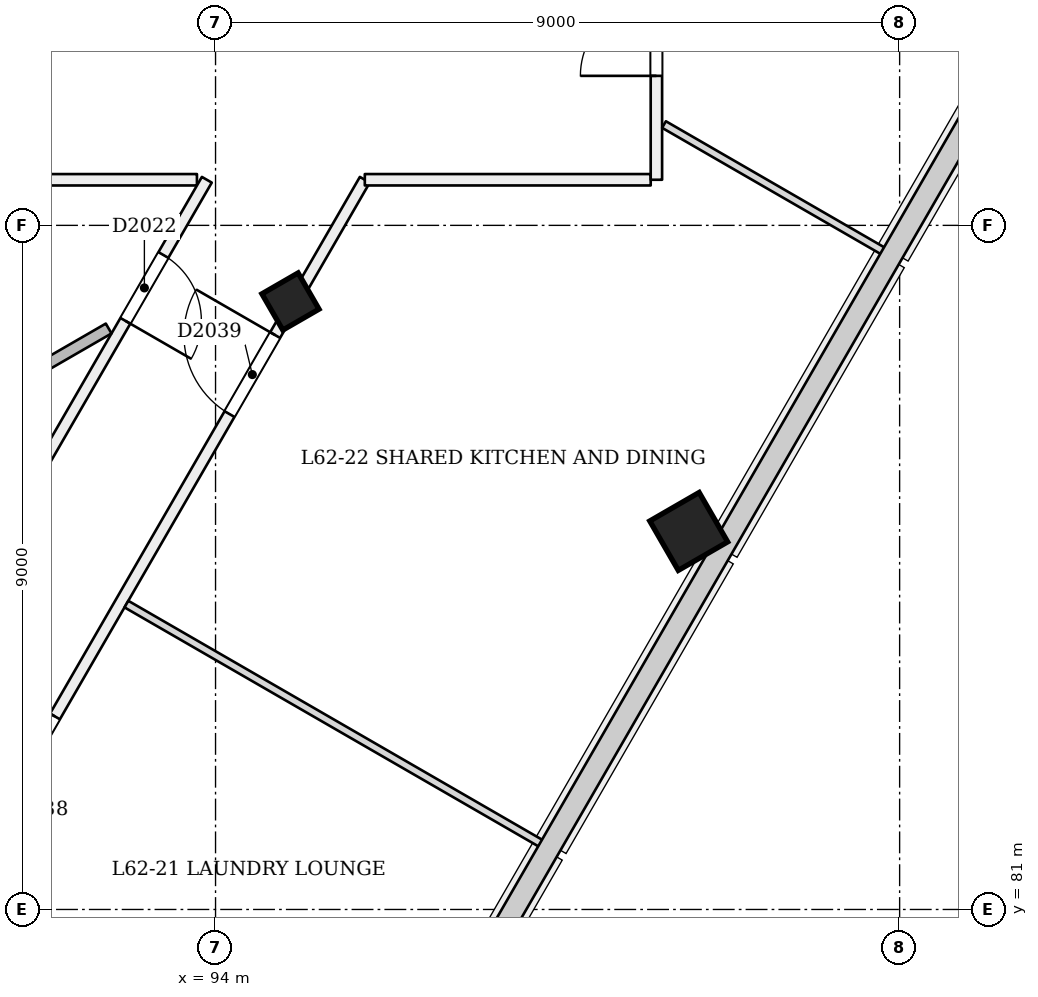
"""IFC4 building model, lengths in metres.
Left out: names, types, materials, properties, quantities, classifications, styles, units other than length and angle.
Written with IfcOpenShell. Run it as: python <this file> out.ifc"""

import sys

from ifc_helpers import new_model, si_unit, direction, frame, frame_2d, origin, origin_2d, place, context, subcontext, project, spatial, rectangle, extrude, element, fill, save


model = new_model("IFC4")
c1 = context("Model", 3, precision=1e-05, world=origin(), true_north=direction((0.0, 1.0)))
c2 = subcontext(c1, "Body", "Model", "MODEL_VIEW")
j1 = project(units=[si_unit("LENGTHUNIT", "METRE"), si_unit("PLANEANGLEUNIT", "RADIAN")], contexts=[c1])
p1 = place(None, origin())
s1 = spatial("IfcSite", under=j1, at=p1, CompositionType="ELEMENT")
p2 = place(p1, origin())
s2 = spatial("IfcBuilding", under=s1, at=p2, CompositionType="ELEMENT")
p3 = place(p2, frame((0.0, 0.0, 242.8)))
s3 = spatial("IfcBuildingStorey", under=s2, at=p3, CompositionType="ELEMENT", Elevation=242.8)
p4 = place(p3, frame((95.013, 88.952, -0.017), z_axis=(-0.02215369191, 0.038413282303, 0.999016333038), x_axis=(-0.500657396395, -0.86536153355, 0.022171776814)))
e1 = element("IfcColumn", 1, at=p4, inside=s3, PredefinedType="COLUMN", context=c2, shape_type="SweptSolid", body=[
    extrude(rectangle(XDim=0.55, YDim=0.55, at=origin_2d()), origin(), (0.0, 0.0, 1.0), 3.604),
])
p5 = place(p3, frame((100.252, 85.926, -0.023), z_axis=(-0.022222852987, 0.038483477124, 0.999012095419), x_axis=(-0.500174596178, -0.865639456654, 0.022219460416)))
e2 = element("IfcColumn", 2, at=p5, inside=s3, PredefinedType="COLUMN", context=c2, shape_type="SweptSolid", body=[
    extrude(rectangle(XDim=0.75, YDim=0.75, at=origin_2d()), origin(), (0.0, 0.0, 1.0), 3.604),
])
p6 = place(p3, frame((88.0, 90.599, 0.0), z_axis=(0.0, 0.0, 1.0), x_axis=(0.999999985605, 0.000169678457, 0.0)))
e3 = element("IfcWall", 3, at=p6, inside=s3, PredefinedType="PARTITIONING", context=c2, shape_type="SweptSolid", body=[
    extrude(rectangle(XDim=5.755, YDim=0.15, at=frame_2d((2.878, 0.0))), origin(), (0.0, 0.0, 1.0), 3.2),
])
p7 = place(p3, frame((85.0, 71.61, 0.0), z_axis=(0.0, 0.0, 1.0), x_axis=(0.499999699483, 0.866025577288, 0.0)))
e4 = element("IfcWall", 4, at=p7, inside=s3, PredefinedType="PARTITIONING", context=c2, shape_type="SweptSolid", body=[
    extrude(rectangle(XDim=21.928, YDim=0.15, at=frame_2d((10.964, 0.0))), origin(), (0.0, 0.0, 1.0), 2.8),
])
p8 = place(p7, frame((0.608, 0.0, 0.0)))
e5 = element("IfcOpeningElement", 5, at=p8, cuts=e4, PredefinedType="OPENING", context=c2, shape_type="SweptSolid", body=[
    extrude(rectangle(XDim=1.0, YDim=2.1, at=frame_2d((0.5, 1.05))), frame((0.0, 0.085, 0.0), z_axis=(0.0, -1.0, 0.0), x_axis=(1.0, 0.0, 0.0)), (0.0, 0.0, 1.0), 0.171),
])
p9 = place(p7, frame((4.804, 0.0, 0.0)))
e6 = element("IfcOpeningElement", 6, at=p9, cuts=e4, PredefinedType="OPENING", context=c2, shape_type="SweptSolid", body=[
    extrude(rectangle(XDim=1.0, YDim=2.1, at=frame_2d((0.5, 1.05))), frame((0.0, 0.085, 0.0), z_axis=(0.0, -1.0, 0.0), x_axis=(1.0, 0.0, 0.0)), (0.0, 0.0, 1.0), 0.171),
])
p10 = place(p7, frame((8.275, 0.0, 0.0)))
e7 = element("IfcOpeningElement", 7, at=p10, cuts=e4, PredefinedType="OPENING", context=c2, shape_type="SweptSolid", body=[
    extrude(rectangle(XDim=1.0, YDim=2.1, at=frame_2d((0.5, 1.05))), frame((0.0, 0.085, 0.0), z_axis=(0.0, -1.0, 0.0), x_axis=(1.0, 0.0, 0.0)), (0.0, 0.0, 1.0), 0.171),
])
p11 = place(p7, frame((12.775, 0.0, 0.0)))
e8 = element("IfcOpeningElement", 8, at=p11, cuts=e4, PredefinedType="OPENING", context=c2, shape_type="SweptSolid", body=[
    extrude(rectangle(XDim=1.0, YDim=2.1, at=frame_2d((0.5, 1.05))), frame((0.0, 0.085, 0.0), z_axis=(0.0, -1.0, 0.0), x_axis=(1.0, 0.0, 0.0)), (0.0, 0.0, 1.0), 0.171),
])
p12 = place(p7, frame((18.368, 0.0, 0.0)))
e9 = element("IfcOpeningElement", 9, at=p12, cuts=e4, PredefinedType="OPENING", context=c2, shape_type="SweptSolid", body=[
    extrude(rectangle(XDim=1.2, YDim=2.1, at=frame_2d((0.6, 1.05))), frame((0.0, 0.085, 0.0), z_axis=(0.0, -1.0, 0.0), x_axis=(1.0, 0.0, 0.0)), (0.0, 0.0, 1.0), 0.171),
])
p13 = place(p3, frame((95.964, 90.6, 0.0), z_axis=(0.0, 0.0, 1.0), x_axis=(1.0, 0.0, 0.0)))
e10 = element("IfcWall", 10, at=p13, inside=s3, PredefinedType="PARTITIONING", context=c2, shape_type="SweptSolid", body=[
    extrude(rectangle(XDim=3.761, YDim=0.15, at=frame_2d((1.881, 0.0))), origin(), (0.0, 0.0, 1.0), 3.2),
])
p14 = place(p3, frame((99.8, 90.6, 0.0), z_axis=(0.0, 0.0, 1.0), x_axis=(0.0, 1.0, 0.0)))
e11 = element("IfcWall", 11, at=p14, inside=s3, PredefinedType="PARTITIONING", context=c2, shape_type="SweptSolid", body=[
    extrude(rectangle(XDim=6.644, YDim=0.15, at=frame_2d((3.322, 0.0))), origin(), (0.0, 0.0, 1.0), 3.2),
])
p15 = place(p14, frame((1.367, 0.0, 0.0)))
e12 = element("IfcOpeningElement", 12, at=p15, cuts=e11, PredefinedType="OPENING", context=c2, shape_type="SweptSolid", body=[
    extrude(rectangle(XDim=1.0, YDim=2.1, at=frame_2d((0.5, 1.05))), frame((0.0, 0.085, 0.0), z_axis=(0.0, -1.0, 0.0), x_axis=(1.0, 0.0, 0.0)), (0.0, 0.0, 1.0), 0.171),
])
p16 = place(p3, frame((93.885, 90.6, 0.0), z_axis=(0.0, 0.0, 1.0), x_axis=(-0.499997192861, -0.866027024481, 0.0)))
e13 = element("IfcWall", 13, at=p16, inside=s3, PredefinedType="PARTITIONING", context=c2, shape_type="SweptSolid", body=[
    extrude(rectangle(XDim=17.641, YDim=0.15, at=frame_2d((8.82, 0.0))), origin(), (0.0, 0.0, 1.0), 3.2),
])
p17 = place(p16, frame((1.143, 0.0, 0.0)))
e14 = element("IfcOpeningElement", 14, at=p17, cuts=e13, PredefinedType="OPENING", context=c2, shape_type="SweptSolid", body=[
    extrude(rectangle(XDim=1.0, YDim=2.1, at=frame_2d((0.5, 1.05))), frame((0.0, 0.085, 0.0), z_axis=(0.0, -1.0, 0.0), x_axis=(1.0, 0.0, 0.0)), (0.0, 0.0, 1.0), 0.171),
])
p18 = place(p16, frame((7.281, 0.0, 0.0)))
e15 = element("IfcOpeningElement", 15, at=p18, cuts=e13, PredefinedType="OPENING", context=c2, shape_type="SweptSolid", body=[
    extrude(rectangle(XDim=1.0, YDim=2.1, at=frame_2d((0.5, 1.05))), frame((0.0, 0.085, 0.0), z_axis=(0.0, -1.0, 0.0), x_axis=(1.0, 0.0, 0.0)), (0.0, 0.0, 1.0), 0.171),
])
p19 = place(p3, frame((88.0, 85.991, 0.0), z_axis=(0.0, 0.0, 1.0), x_axis=(0.86602540409, 0.49999999947, 0.0)))
e16 = element("IfcWall", 16, at=p19, inside=s3, PredefinedType="PARTITIONING", context=c2, shape_type="SweptSolid", body=[
    extrude(rectangle(XDim=5.305, YDim=0.15, at=frame_2d((2.652, 0.0))), origin(), (0.0, 0.0, 1.0), 3.2),
])
p20 = place(p3, frame((96.055, 77.958, 0.0), z_axis=(0.0, 0.0, 1.0), x_axis=(-0.866032601554, 0.49998753289, 0.0)))
e17 = element("IfcWall", 17, at=p20, inside=s3, PredefinedType="PARTITIONING", context=c2, shape_type="SweptSolid", body=[
    extrude(rectangle(XDim=6.325, YDim=0.1, at=frame_2d((3.163, 0.0))), origin(), (0.0, 0.0, 1.0), 2.7),
])
p21 = place(p3, frame((98.323, 81.845, 0.0), z_axis=(0.0, 0.0, 1.0), x_axis=(-0.866025401434, 0.500000004071, 0.0)))
e18 = element("IfcWall", 18, at=p21, inside=s3, PredefinedType="PARTITIONING", context=c2, shape_type="SweptSolid", body=[
    extrude(rectangle(XDim=6.345, YDim=0.1, at=frame_2d((3.173, 0.0))), origin(), (0.0, 0.0, 1.0), 2.7),
])
p22 = place(p3, frame((102.823, 89.639, 0.0), z_axis=(0.0, 0.0, 1.0), x_axis=(-0.866039815758, 0.499975036898, 0.0)))
e19 = element("IfcWall", 19, at=p22, inside=s3, PredefinedType="PARTITIONING", context=c2, shape_type="SweptSolid", body=[
    extrude(rectangle(XDim=3.375, YDim=0.1, at=frame_2d((1.688, 0.0))), origin(), (0.0, 0.0, 1.0), 2.7),
])
p23 = place(p17, origin())
e20 = element("IfcDoor", 20, at=p23, inside=s3, OperationType="SINGLE_SWING_RIGHT", PredefinedType="NOTDEFINED", context=c2, shape_type="SweptSolid", body=[
    extrude(rectangle(XDim=1.0, YDim=2.1, at=frame_2d((0.5, 1.05))), frame((0.0, 0.025, 0.0), z_axis=(0.0, -1.0, 0.0), x_axis=(1.0, 0.0, 0.0)), (0.0, 0.0, 1.0), 0.05),
])
fill(e14, e20)
p24 = place(p11, origin())
e21 = element("IfcDoor", 21, at=p24, inside=s3, OperationType="SINGLE_SWING_RIGHT", PredefinedType="NOTDEFINED", context=c2, shape_type="SweptSolid", body=[
    extrude(rectangle(XDim=1.0, YDim=2.1, at=frame_2d((0.5, 1.05))), frame((0.0, 0.025, 0.0), z_axis=(0.0, -1.0, 0.0), x_axis=(1.0, 0.0, 0.0)), (0.0, 0.0, 1.0), 0.05),
])
fill(e8, e21)
p25 = place(p12, origin())
e22 = element("IfcDoor", 22, at=p25, inside=s3, OperationType="SINGLE_SWING_RIGHT", PredefinedType="NOTDEFINED", context=c2, shape_type="SweptSolid", body=[
    extrude(rectangle(XDim=1.2, YDim=2.1, at=frame_2d((0.6, 1.05))), frame((0.0, 0.025, 0.0), z_axis=(0.0, -1.0, 0.0), x_axis=(1.0, 0.0, 0.0)), (0.0, 0.0, 1.0), 0.05),
])
fill(e9, e22)
p26 = place(p15, origin())
e23 = element("IfcDoor", 23, at=p26, inside=s3, OperationType="SINGLE_SWING_LEFT", PredefinedType="NOTDEFINED", context=c2, shape_type="SweptSolid", body=[
    extrude(rectangle(XDim=1.0, YDim=2.1, at=frame_2d((0.5, 1.05))), frame((0.0, 0.025, 0.0), z_axis=(0.0, -1.0, 0.0), x_axis=(1.0, 0.0, 0.0)), (0.0, 0.0, 1.0), 0.05),
])
fill(e12, e23)
save(model, sys.argv[1])
